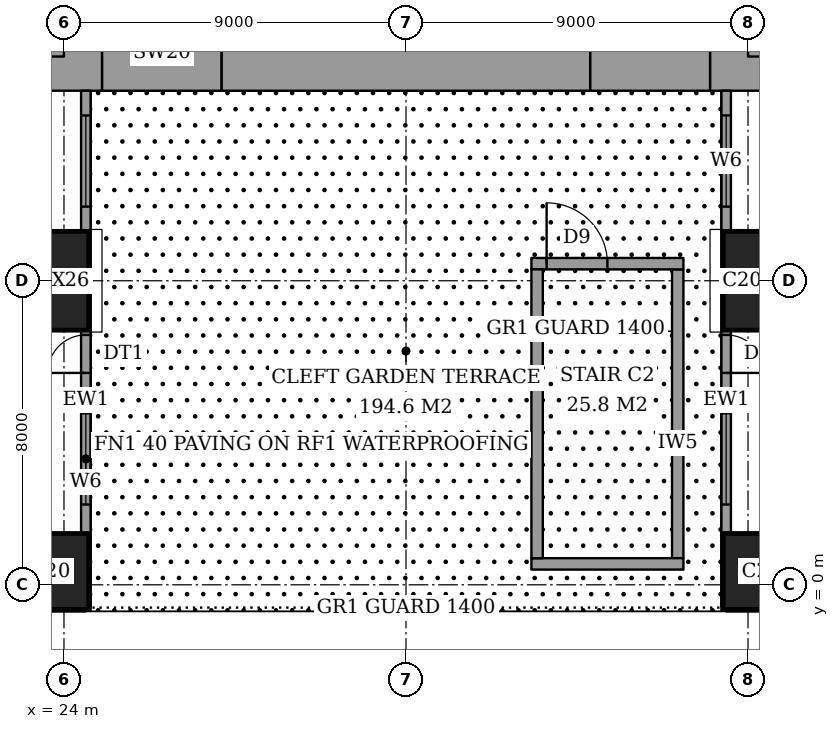
"""IFC4 building model, lengths in metres.
Left out: names, types, materials, properties, quantities, classifications, styles, units other than length and angle.
Written with IfcOpenShell. Run it as: python <this file> out.ifc"""

import sys

from ifc_helpers import new_model, si_unit, direction, frame, frame_2d, origin, origin_2d, place, context, subcontext, project, spatial, rectangle, extrude, element, fill, save


model = new_model("IFC4")
c1 = context("Model", 3, precision=1e-05, world=origin(), true_north=direction((0.0, 1.0)))
c2 = subcontext(c1, "Body", "Model", "MODEL_VIEW")
j1 = project(units=[si_unit("LENGTHUNIT", "METRE"), si_unit("PLANEANGLEUNIT", "RADIAN")], contexts=[c1])
p1 = place(None, origin())
s1 = spatial("IfcSite", under=j1, at=p1, CompositionType="ELEMENT")
p2 = place(p1, origin())
s2 = spatial("IfcBuilding", under=s1, at=p2, CompositionType="ELEMENT")
p3 = place(p2, frame((0.0, 0.0, 26.0)))
s3 = spatial("IfcBuildingStorey", under=s2, at=p3, CompositionType="ELEMENT", Elevation=26.0)
p4 = place(p3, frame((23.65, 0.35, 0.0), z_axis=(0.0, 0.0, 1.0), x_axis=(1.0, 0.0, 0.0)))
e1 = element("IfcColumn", 1, at=p4, inside=s3, PredefinedType="COLUMN", context=c2, shape_type="SweptSolid", body=[
    extrude(rectangle(XDim=2.0, YDim=2.0, at=origin_2d()), origin(), (0.0, 0.0, 1.0), 3.6),
])
p5 = place(p3, frame((23.65, 8.0, 0.0), z_axis=(0.0, 0.0, 1.0), x_axis=(1.0, 0.0, 0.0)))
e2 = element("IfcColumn", 2, at=p5, inside=s3, PredefinedType="COLUMN", context=c2, shape_type="SweptSolid", body=[
    extrude(rectangle(XDim=2.0, YDim=2.6, at=origin_2d()), origin(), (0.0, 0.0, 1.0), 3.6),
])
p6 = place(p3, frame((42.35, 0.35, 0.0), z_axis=(0.0, 0.0, 1.0), x_axis=(1.0, 0.0, 0.0)))
e3 = element("IfcColumn", 3, at=p6, inside=s3, PredefinedType="COLUMN", context=c2, shape_type="SweptSolid", body=[
    extrude(rectangle(XDim=2.0, YDim=2.0, at=origin_2d()), origin(), (0.0, 0.0, 1.0), 3.6),
])
p7 = place(p3, frame((42.35, 8.0, 0.0), z_axis=(0.0, 0.0, 1.0), x_axis=(1.0, 0.0, 0.0)))
e4 = element("IfcColumn", 4, at=p7, inside=s3, PredefinedType="COLUMN", context=c2, shape_type="SweptSolid", body=[
    extrude(rectangle(XDim=2.0, YDim=2.6, at=origin_2d()), origin(), (0.0, 0.0, 1.0), 3.6),
])
p8 = place(p3, frame((25.0, 14.0, 0.0), z_axis=(0.0, 0.0, 1.0), x_axis=(1.0, 0.0, 0.0)))
e5 = element("IfcWall", 5, at=p8, inside=s3, PredefinedType="SHEAR", context=c2, shape_type="SweptSolid", body=[
    extrude(rectangle(XDim=3.15, YDim=2.0, at=frame_2d((1.575, 0.0))), origin(), (0.0, 0.0, 1.0), 3.6),
])
p9 = place(p3, frame((28.15, 14.0, 0.0), z_axis=(0.0, 0.0, 1.0), x_axis=(1.0, 0.0, 0.0)))
e6 = element("IfcWall", 6, at=p9, inside=s3, PredefinedType="SHEAR", context=c2, shape_type="SweptSolid", body=[
    extrude(rectangle(XDim=9.7, YDim=2.0, at=frame_2d((4.85, 0.0))), origin(), (0.0, 0.0, 1.0), 3.6),
])
p10 = place(p3, frame((37.85, 14.0, 0.0), z_axis=(0.0, 0.0, 1.0), x_axis=(1.0, 0.0, 0.0)))
e7 = element("IfcWall", 7, at=p10, inside=s3, PredefinedType="SHEAR", context=c2, shape_type="SweptSolid", body=[
    extrude(rectangle(XDim=3.15, YDim=2.0, at=frame_2d((1.575, 0.0))), origin(), (0.0, 0.0, 1.0), 3.6),
])
p11 = place(p3, frame((24.3, 13.0, 0.0), z_axis=(0.0, 0.0, 1.0), x_axis=(0.0, 1.0, 0.0)))
e8 = element("IfcWall", 8, at=p11, inside=s3, PredefinedType="SHEAR", context=c2, shape_type="SweptSolid", body=[
    extrude(rectangle(XDim=10.15, YDim=1.4, at=frame_2d((5.075, 0.0))), origin(), (0.0, 0.0, 1.0), 3.6),
])
p12 = place(p3, frame((41.7, 13.0, 0.0), z_axis=(0.0, 0.0, 1.0), x_axis=(0.0, 1.0, 0.0)))
e9 = element("IfcWall", 9, at=p12, inside=s3, PredefinedType="SHEAR", context=c2, shape_type="SweptSolid", body=[
    extrude(rectangle(XDim=11.85, YDim=1.4, at=frame_2d((5.925, 0.0))), origin(), (0.0, 0.0, 1.0), 3.6),
])
p13 = place(p12, frame((7.5, 0.0, 0.0)))
e10 = element("IfcOpeningElement", 10, at=p13, cuts=e9, PredefinedType="OPENING", context=c2, shape_type="SweptSolid", body=[
    extrude(rectangle(XDim=1.8, YDim=2.4, at=frame_2d((0.9, 1.2))), frame((0.0, 0.71, 0.0), z_axis=(0.0, -1.0, 0.0), x_axis=(1.0, 0.0, 0.0)), (0.0, 0.0, 1.0), 1.42),
])
p14 = place(p3, frame((24.575, -0.575, 0.0), z_axis=(0.0, 0.0, 1.0), x_axis=(0.0, 1.0, 0.0)))
e11 = element("IfcWall", 11, at=p14, inside=s3, PredefinedType="SOLIDWALL", context=c2, shape_type="SweptSolid", body=[
    extrude(rectangle(XDim=13.575, YDim=0.25, at=frame_2d((6.788, 0.0))), origin(), (0.0, 0.0, 1.0), 3.6),
])
p15 = place(p14, frame((6.15, 0.0, 0.0)))
e12 = element("IfcOpeningElement", 12, at=p15, cuts=e11, PredefinedType="OPENING", context=c2, shape_type="SweptSolid", body=[
    extrude(rectangle(XDim=1.0, YDim=2.4, at=frame_2d((0.5, 1.2))), frame((0.0, 0.135, 0.0), z_axis=(0.0, -1.0, 0.0), x_axis=(1.0, 0.0, 0.0)), (0.0, 0.0, 1.0), 0.27),
])
p16 = place(p14, frame((2.688, 0.0, 0.6)))
e13 = element("IfcOpeningElement", 13, at=p16, cuts=e11, PredefinedType="OPENING", context=c2, shape_type="SweptSolid", body=[
    extrude(rectangle(XDim=2.4, YDim=2.0, at=frame_2d((1.2, 1.0))), frame((0.0, 0.135, 0.0), z_axis=(0.0, -1.0, 0.0), x_axis=(1.0, 0.0, 0.0)), (0.0, 0.0, 1.0), 0.27),
])
p17 = place(p14, frame((10.525, 0.0, 0.6)))
e14 = element("IfcOpeningElement", 14, at=p17, cuts=e11, PredefinedType="OPENING", context=c2, shape_type="SweptSolid", body=[
    extrude(rectangle(XDim=2.4, YDim=2.0, at=frame_2d((1.2, 1.0))), frame((0.0, 0.135, 0.0), z_axis=(0.0, -1.0, 0.0), x_axis=(1.0, 0.0, 0.0)), (0.0, 0.0, 1.0), 0.27),
])
p18 = place(p3, frame((41.425, 13.0, 0.0), z_axis=(0.0, 0.0, 1.0), x_axis=(0.0, -1.0, 0.0)))
e15 = element("IfcWall", 15, at=p18, inside=s3, PredefinedType="SOLIDWALL", context=c2, shape_type="SweptSolid", body=[
    extrude(rectangle(XDim=13.575, YDim=0.25, at=frame_2d((6.788, 0.0))), origin(), (0.0, 0.0, 1.0), 3.6),
])
p19 = place(p18, frame((6.425, 0.0, 0.0)))
e16 = element("IfcOpeningElement", 16, at=p19, cuts=e15, PredefinedType="OPENING", context=c2, shape_type="SweptSolid", body=[
    extrude(rectangle(XDim=1.0, YDim=2.4, at=frame_2d((0.5, 1.2))), frame((0.0, 0.135, 0.0), z_axis=(0.0, -1.0, 0.0), x_axis=(1.0, 0.0, 0.0)), (0.0, 0.0, 1.0), 0.27),
])
p20 = place(p18, frame((0.65, 0.0, 0.6)))
e17 = element("IfcOpeningElement", 17, at=p20, cuts=e15, PredefinedType="OPENING", context=c2, shape_type="SweptSolid", body=[
    extrude(rectangle(XDim=2.4, YDim=2.0, at=frame_2d((1.2, 1.0))), frame((0.0, 0.135, 0.0), z_axis=(0.0, -1.0, 0.0), x_axis=(1.0, 0.0, 0.0)), (0.0, 0.0, 1.0), 0.27),
])
p21 = place(p18, frame((8.488, 0.0, 0.6)))
e18 = element("IfcOpeningElement", 18, at=p21, cuts=e15, PredefinedType="OPENING", context=c2, shape_type="SweptSolid", body=[
    extrude(rectangle(XDim=2.4, YDim=2.0, at=frame_2d((1.2, 1.0))), frame((0.0, 0.135, 0.0), z_axis=(0.0, -1.0, 0.0), x_axis=(1.0, 0.0, 0.0)), (0.0, 0.0, 1.0), 0.27),
])
p22 = place(p3, frame((41.425, -0.575, 0.0), z_axis=(0.0, 0.0, 1.0), x_axis=(1.0, 0.0, 0.0)))
e19 = element("IfcWall", 19, at=p22, inside=s3, PredefinedType="SOLIDWALL", context=c2, shape_type="SweptSolid", body=[
    extrude(rectangle(XDim=21.4, YDim=0.25, at=frame_2d((10.7, 0.0))), origin(), (0.0, 0.0, 1.0), 3.6),
])
p23 = place(p22, frame((3.55, 0.0, 0.6)))
e20 = element("IfcOpeningElement", 20, at=p23, cuts=e19, PredefinedType="OPENING", context=c2, shape_type="SweptSolid", body=[
    extrude(rectangle(XDim=2.4, YDim=2.0, at=frame_2d((1.2, 1.0))), frame((0.0, 0.135, 0.0), z_axis=(0.0, -1.0, 0.0), x_axis=(1.0, 0.0, 0.0)), (0.0, 0.0, 1.0), 0.27),
])
p24 = place(p22, frame((11.375, 0.0, 0.6)))
e21 = element("IfcOpeningElement", 21, at=p24, cuts=e19, PredefinedType="OPENING", context=c2, shape_type="SweptSolid", body=[
    extrude(rectangle(XDim=2.4, YDim=2.0, at=frame_2d((1.2, 1.0))), frame((0.0, 0.135, 0.0), z_axis=(0.0, -1.0, 0.0), x_axis=(1.0, 0.0, 0.0)), (0.0, 0.0, 1.0), 0.27),
])
p25 = place(p22, frame((18.225, 0.0, 0.6)))
e22 = element("IfcOpeningElement", 22, at=p25, cuts=e19, PredefinedType="OPENING", context=c2, shape_type="SweptSolid", body=[
    extrude(rectangle(XDim=2.4, YDim=2.0, at=frame_2d((1.2, 1.0))), frame((0.0, 0.135, 0.0), z_axis=(0.0, -1.0, 0.0), x_axis=(1.0, 0.0, 0.0)), (0.0, 0.0, 1.0), 0.27),
])
p26 = place(p3, frame((3.175, -0.575, 0.0), z_axis=(0.0, 0.0, 1.0), x_axis=(1.0, 0.0, 0.0)))
e23 = element("IfcWall", 23, at=p26, inside=s3, PredefinedType="SOLIDWALL", context=c2, shape_type="SweptSolid", body=[
    extrude(rectangle(XDim=21.4, YDim=0.25, at=frame_2d((10.7, 0.0))), origin(), (0.0, 0.0, 1.0), 3.6),
])
p27 = place(p26, frame((0.775, 0.0, 0.6)))
e24 = element("IfcOpeningElement", 24, at=p27, cuts=e23, PredefinedType="OPENING", context=c2, shape_type="SweptSolid", body=[
    extrude(rectangle(XDim=2.4, YDim=2.0, at=frame_2d((1.2, 1.0))), frame((0.0, 0.135, 0.0), z_axis=(0.0, -1.0, 0.0), x_axis=(1.0, 0.0, 0.0)), (0.0, 0.0, 1.0), 0.27),
])
p28 = place(p26, frame((7.625, 0.0, 0.6)))
e25 = element("IfcOpeningElement", 25, at=p28, cuts=e23, PredefinedType="OPENING", context=c2, shape_type="SweptSolid", body=[
    extrude(rectangle(XDim=2.4, YDim=2.0, at=frame_2d((1.2, 1.0))), frame((0.0, 0.135, 0.0), z_axis=(0.0, -1.0, 0.0), x_axis=(1.0, 0.0, 0.0)), (0.0, 0.0, 1.0), 0.27),
])
p29 = place(p26, frame((15.45, 0.0, 0.6)))
e26 = element("IfcOpeningElement", 26, at=p29, cuts=e23, PredefinedType="OPENING", context=c2, shape_type="SweptSolid", body=[
    extrude(rectangle(XDim=2.4, YDim=2.0, at=frame_2d((1.2, 1.0))), frame((0.0, 0.135, 0.0), z_axis=(0.0, -1.0, 0.0), x_axis=(1.0, 0.0, 0.0)), (0.0, 0.0, 1.0), 0.27),
])
for number, where, z_axis, x_axis in (
    (27, (18.9, 14.0, 0.0), (0.0, 0.0, 1.0), (1.0, 0.0, 0.0)),
    (28, (42.0, 14.0, 0.0), (0.0, 0.0, 1.0), (1.0, 0.0, 0.0)),
):
    element("IfcWall", number, at=place(p3, frame(where, z_axis=z_axis, x_axis=x_axis)), inside=s3, PredefinedType="PARTITIONING", context=c2, shape_type="SweptSolid", body=[
        extrude(rectangle(XDim=5.1, YDim=0.2, at=frame_2d((2.55, 0.0))), origin(), (0.0, 0.0, 1.0), 3.35),
    ])
p30 = place(p3, frame((36.3, 0.55, 0.0), z_axis=(0.0, 0.0, 1.0), x_axis=(1.0, 0.0, 0.0)))
e29 = element("IfcWall", 29, at=p30, inside=s3, PredefinedType="PARTITIONING", context=c2, shape_type="SweptSolid", body=[
    extrude(rectangle(XDim=4.0, YDim=0.3, at=frame_2d((2.0, 0.0))), origin(), (0.0, 0.0, 1.0), 3.35),
])
p31 = place(p3, frame((36.3, 8.45, 0.0), z_axis=(0.0, 0.0, 1.0), x_axis=(1.0, 0.0, 0.0)))
e30 = element("IfcWall", 30, at=p31, inside=s3, PredefinedType="PARTITIONING", context=c2, shape_type="SweptSolid", body=[
    extrude(rectangle(XDim=4.0, YDim=0.3, at=frame_2d((2.0, 0.0))), origin(), (0.0, 0.0, 1.0), 3.35),
])
p32 = place(p31, frame((0.4, 0.0, 0.0)))
e31 = element("IfcOpeningElement", 31, at=p32, cuts=e30, PredefinedType="OPENING", context=c2, shape_type="SweptSolid", body=[
    extrude(rectangle(XDim=1.6, YDim=2.1, at=frame_2d((0.8, 1.05))), frame((0.0, 0.16, 0.0), z_axis=(0.0, -1.0, 0.0), x_axis=(1.0, 0.0, 0.0)), (0.0, 0.0, 1.0), 0.32),
])
for number, where, z_axis, x_axis in (
    (32, (36.45, 0.7, 0.0), (0.0, 0.0, 1.0), (0.0, 1.0, 0.0)),
    (33, (40.15, 0.7, 0.0), (0.0, 0.0, 1.0), (0.0, 1.0, 0.0)),
):
    element("IfcWall", number, at=place(p3, frame(where, z_axis=z_axis, x_axis=x_axis)), inside=s3, PredefinedType="PARTITIONING", context=c2, shape_type="SweptSolid", body=[
        extrude(rectangle(XDim=7.6, YDim=0.3, at=frame_2d((3.8, 0.0))), origin(), (0.0, 0.0, 1.0), 3.35),
    ])
p33 = place(p15, origin())
e34 = element("IfcDoor", 34, at=p33, inside=s3, OperationType="SINGLE_SWING_RIGHT", PredefinedType="DOOR", context=c2, shape_type="SweptSolid", body=[
    extrude(rectangle(XDim=1.0, YDim=2.4, at=frame_2d((0.5, 1.2))), frame((0.0, 0.025, 0.0), z_axis=(0.0, -1.0, 0.0), x_axis=(1.0, 0.0, 0.0)), (0.0, 0.0, 1.0), 0.05),
])
fill(e12, e34)
p34 = place(p16, origin())
e35 = element("IfcWindow", 35, at=p34, inside=s3, PartitioningType="SINGLE_PANEL", PredefinedType="WINDOW", context=c2, shape_type="SweptSolid", body=[
    extrude(rectangle(XDim=2.4, YDim=2.0, at=frame_2d((1.2, 1.0))), frame((0.0, 0.03, 0.0), z_axis=(0.0, -1.0, 0.0), x_axis=(1.0, 0.0, 0.0)), (0.0, 0.0, 1.0), 0.06),
])
fill(e13, e35)
p35 = place(p17, origin())
e36 = element("IfcWindow", 36, at=p35, inside=s3, PartitioningType="SINGLE_PANEL", PredefinedType="WINDOW", context=c2, shape_type="SweptSolid", body=[
    extrude(rectangle(XDim=2.4, YDim=2.0, at=frame_2d((1.2, 1.0))), frame((0.0, 0.03, 0.0), z_axis=(0.0, -1.0, 0.0), x_axis=(1.0, 0.0, 0.0)), (0.0, 0.0, 1.0), 0.06),
])
fill(e14, e36)
p36 = place(p19, origin())
e37 = element("IfcDoor", 37, at=p36, inside=s3, OperationType="SINGLE_SWING_LEFT", PredefinedType="DOOR", context=c2, shape_type="SweptSolid", body=[
    extrude(rectangle(XDim=1.0, YDim=2.4, at=frame_2d((0.5, 1.2))), frame((0.0, 0.025, 0.0), z_axis=(0.0, -1.0, 0.0), x_axis=(1.0, 0.0, 0.0)), (0.0, 0.0, 1.0), 0.05),
])
fill(e16, e37)
p37 = place(p20, origin())
e38 = element("IfcWindow", 38, at=p37, inside=s3, PartitioningType="SINGLE_PANEL", PredefinedType="WINDOW", context=c2, shape_type="SweptSolid", body=[
    extrude(rectangle(XDim=2.4, YDim=2.0, at=frame_2d((1.2, 1.0))), frame((0.0, 0.03, 0.0), z_axis=(0.0, -1.0, 0.0), x_axis=(1.0, 0.0, 0.0)), (0.0, 0.0, 1.0), 0.06),
])
fill(e17, e38)
p38 = place(p21, origin())
e39 = element("IfcWindow", 39, at=p38, inside=s3, PartitioningType="SINGLE_PANEL", PredefinedType="WINDOW", context=c2, shape_type="SweptSolid", body=[
    extrude(rectangle(XDim=2.4, YDim=2.0, at=frame_2d((1.2, 1.0))), frame((0.0, 0.03, 0.0), z_axis=(0.0, -1.0, 0.0), x_axis=(1.0, 0.0, 0.0)), (0.0, 0.0, 1.0), 0.06),
])
fill(e18, e39)
p39 = place(p32, origin())
e40 = element("IfcDoor", 40, at=p39, inside=s3, OperationType="DOUBLE_DOOR_SINGLE_SWING", PredefinedType="DOOR", context=c2, shape_type="SweptSolid", body=[
    extrude(rectangle(XDim=1.6, YDim=2.1, at=frame_2d((0.8, 1.05))), frame((0.0, 0.025, 0.0), z_axis=(0.0, -1.0, 0.0), x_axis=(1.0, 0.0, 0.0)), (0.0, 0.0, 1.0), 0.05),
])
fill(e31, e40)
save(model, sys.argv[1])
